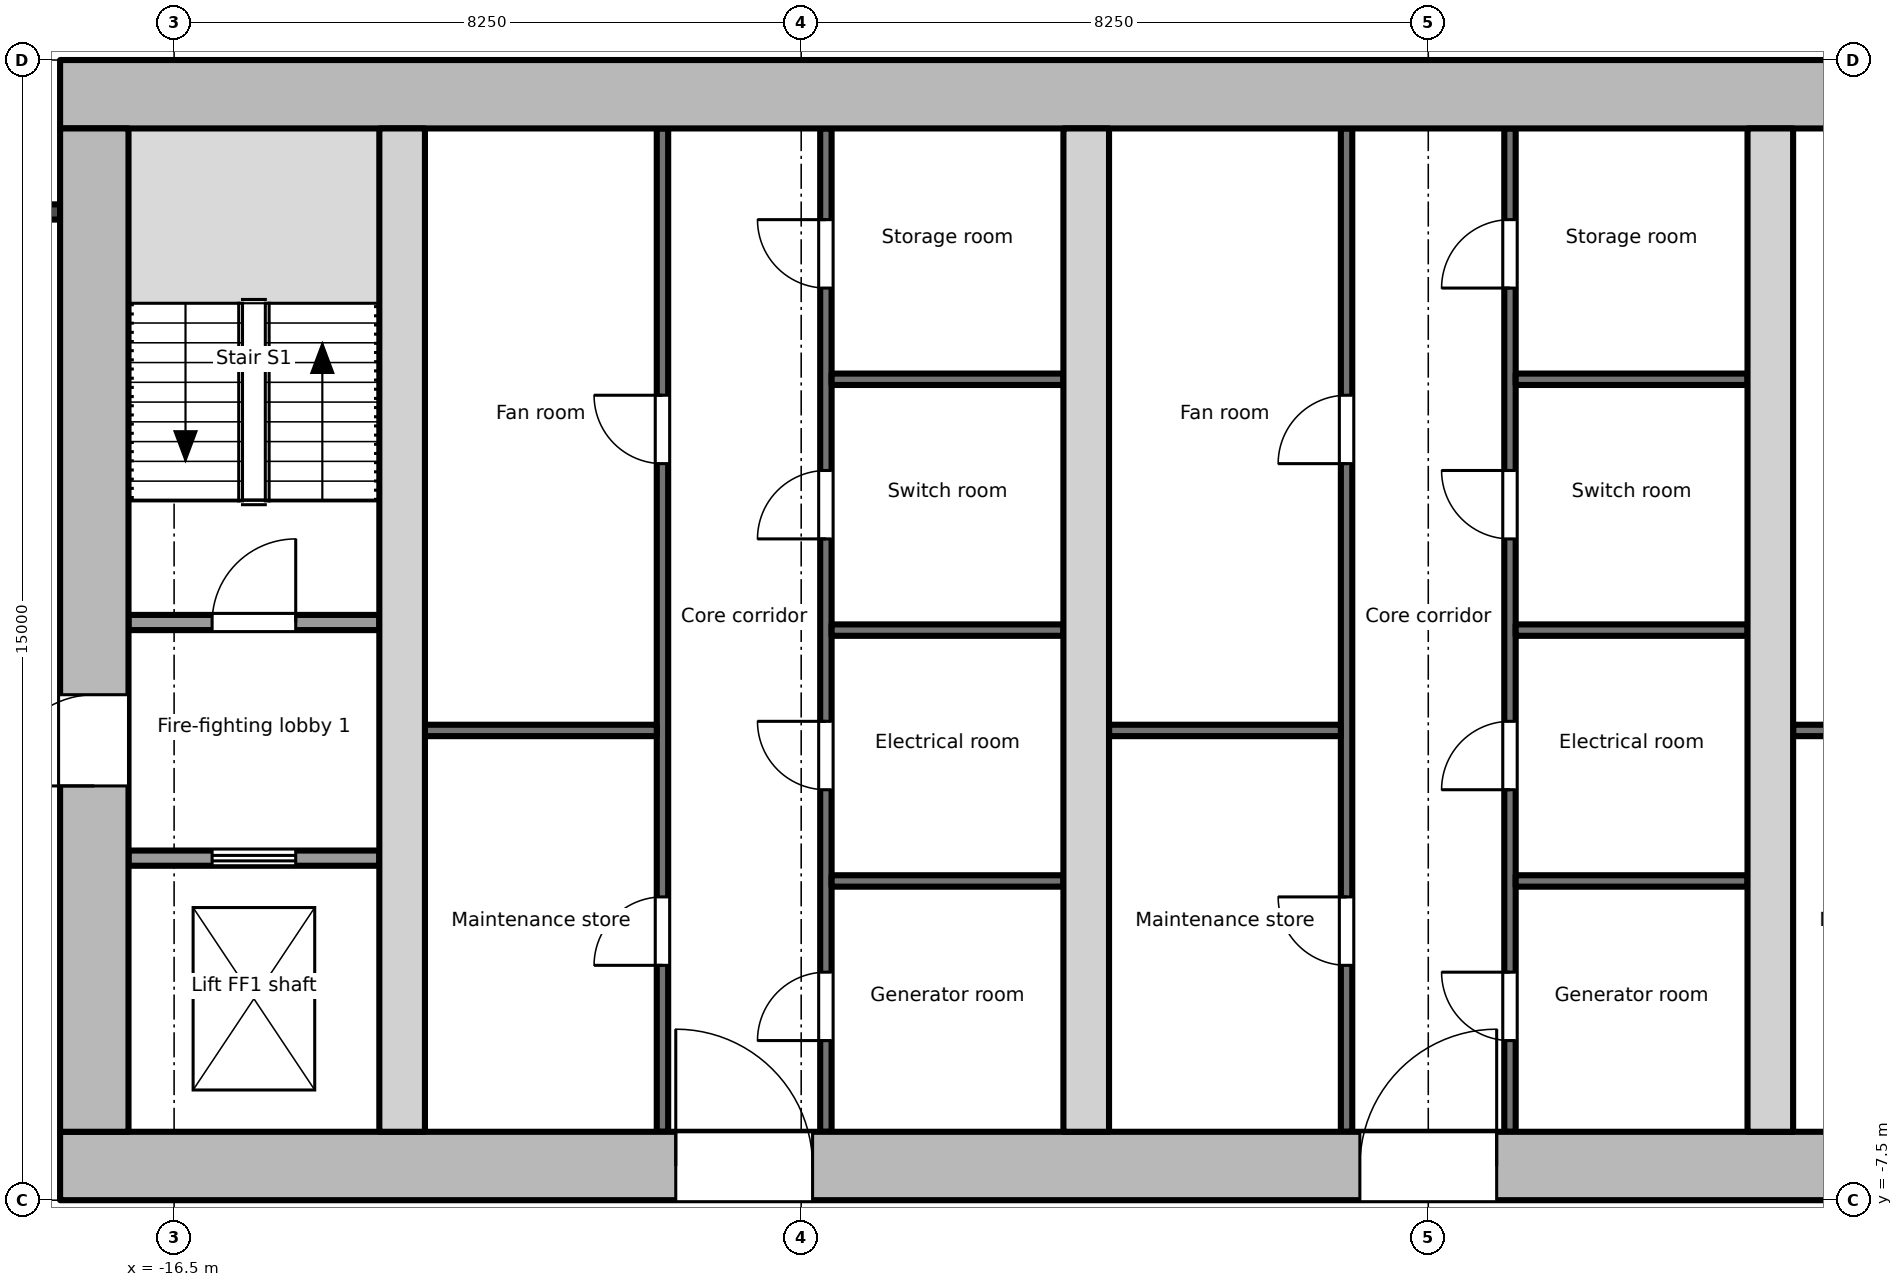
"""IFC4 building model, lengths in metres.
Left out: names, types, materials, properties, quantities, classifications, styles, units other than length and angle.
Written with IfcOpenShell. Run it as: python <this file> out.ifc"""

import sys

from ifc_helpers import new_model, si_unit, direction, frame, frame_2d, origin, place, context, subcontext, project, spatial, rectangle, extrude, element, fill, save


model = new_model("IFC4")
c1 = context("Model", 3, precision=1e-05, world=origin(), true_north=direction((0.0, 1.0)))
c2 = subcontext(c1, "Body", "Model", "MODEL_VIEW")
j1 = project(units=[si_unit("LENGTHUNIT", "METRE"), si_unit("PLANEANGLEUNIT", "RADIAN")], contexts=[c1])
p1 = place(None, origin())
s1 = spatial("IfcSite", under=j1, at=p1, CompositionType="ELEMENT")
p2 = place(p1, origin())
s2 = spatial("IfcBuilding", under=s1, at=p2, CompositionType="ELEMENT")
p3 = place(p2, frame((0.0, 0.0, 300.3)))
s3 = spatial("IfcBuildingStorey", under=s2, at=p3, CompositionType="ELEMENT", Elevation=300.3)
p4 = place(p3, frame((-18.0, -7.05, -0.2), z_axis=(0.0, 0.0, 1.0), x_axis=(1.0, 0.0, 0.0)))
e1 = element("IfcWall", 1, at=p4, inside=s3, PredefinedType="SHEAR", context=c2, shape_type="SweptSolid", body=[
    extrude(rectangle(XDim=36.0, YDim=0.9, at=frame_2d((18.0, 0.0))), origin(), (0.0, 0.0, 1.0), 4.0),
])
p5 = place(p4, frame((8.1, 0.0, 0.2)))
e2 = element("IfcOpeningElement", 2, at=p5, cuts=e1, PredefinedType="OPENING", context=c2, shape_type="SweptSolid", body=[
    extrude(rectangle(XDim=1.8, YDim=2.1, at=frame_2d((0.9, 1.05))), frame((0.0, 0.46, 0.0), z_axis=(0.0, -1.0, 0.0), x_axis=(1.0, 0.0, 0.0)), (0.0, 0.0, 1.0), 0.921),
])
p6 = place(p4, frame((17.1, 0.0, 0.2)))
e3 = element("IfcOpeningElement", 3, at=p6, cuts=e1, PredefinedType="OPENING", context=c2, shape_type="SweptSolid", body=[
    extrude(rectangle(XDim=1.8, YDim=2.1, at=frame_2d((0.9, 1.05))), frame((0.0, 0.46, 0.0), z_axis=(0.0, -1.0, 0.0), x_axis=(1.0, 0.0, 0.0)), (0.0, 0.0, 1.0), 0.921),
])
p7 = place(p4, frame((26.1, 0.0, 0.2)))
e4 = element("IfcOpeningElement", 4, at=p7, cuts=e1, PredefinedType="OPENING", context=c2, shape_type="SweptSolid", body=[
    extrude(rectangle(XDim=1.8, YDim=2.1, at=frame_2d((0.9, 1.05))), frame((0.0, 0.46, 0.0), z_axis=(0.0, -1.0, 0.0), x_axis=(1.0, 0.0, 0.0)), (0.0, 0.0, 1.0), 0.921),
])
p8 = place(p3, frame((-18.0, 7.05, -0.2), z_axis=(0.0, 0.0, 1.0), x_axis=(1.0, 0.0, 0.0)))
e5 = element("IfcWall", 5, at=p8, inside=s3, PredefinedType="SHEAR", context=c2, shape_type="SweptSolid", body=[
    extrude(rectangle(XDim=36.0, YDim=0.9, at=frame_2d((18.0, 0.0))), origin(), (0.0, 0.0, 1.0), 4.0),
])
p9 = place(p3, frame((-17.55, -6.6, -0.2), z_axis=(0.0, 0.0, 1.0), x_axis=(0.0, 1.0, 0.0)))
e6 = element("IfcWall", 6, at=p9, inside=s3, PredefinedType="SHEAR", context=c2, shape_type="SweptSolid", body=[
    extrude(rectangle(XDim=13.2, YDim=0.9, at=frame_2d((6.6, 0.0))), origin(), (0.0, 0.0, 1.0), 4.0),
])
p10 = place(p9, frame((4.55, 0.0, 0.2)))
e7 = element("IfcOpeningElement", 7, at=p10, cuts=e6, PredefinedType="OPENING", context=c2, shape_type="SweptSolid", body=[
    extrude(rectangle(XDim=1.2, YDim=2.1, at=frame_2d((0.6, 1.05))), frame((0.0, 0.46, 0.0), z_axis=(0.0, -1.0, 0.0), x_axis=(1.0, 0.0, 0.0)), (0.0, 0.0, 1.0), 0.921),
])
for number, where, z_axis, x_axis in (
    (8, (-13.5, -6.6, -0.2), (0.0, 0.0, 1.0), (0.0, 1.0, 0.0)),
    (9, (-4.5, -6.6, -0.2), (0.0, 0.0, 1.0), (0.0, 1.0, 0.0)),
    (10, (4.5, -6.6, -0.2), (0.0, 0.0, 1.0), (0.0, 1.0, 0.0)),
):
    element("IfcWall", number, at=place(p3, frame(where, z_axis=z_axis, x_axis=x_axis)), inside=s3, PredefinedType="SHEAR", context=c2, shape_type="SweptSolid", body=[
        extrude(rectangle(XDim=13.2, YDim=0.6, at=frame_2d((6.6, 0.0))), origin(), (0.0, 0.0, 1.0), 4.0),
    ])
p11 = place(p3, frame((-17.1, -3.0, 0.0), z_axis=(0.0, 0.0, 1.0), x_axis=(1.0, 0.0, 0.0)))
e11 = element("IfcWall", 11, at=p11, inside=s3, PredefinedType="PARTITIONING", context=c2, shape_type="SweptSolid", body=[
    extrude(rectangle(XDim=3.3, YDim=0.2, at=frame_2d((1.65, 0.0))), origin(), (0.0, 0.0, 1.0), 3.8),
])
p12 = place(p11, frame((1.1, 0.0, 0.0)))
e12 = element("IfcOpeningElement", 12, at=p12, cuts=e11, PredefinedType="OPENING", context=c2, shape_type="SweptSolid", body=[
    extrude(rectangle(XDim=1.1, YDim=2.1, at=frame_2d((0.55, 1.05))), frame((0.0, 0.111, 0.0), z_axis=(0.0, -1.0, 0.0), x_axis=(1.0, 0.0, 0.0)), (0.0, 0.0, 1.0), 0.221),
])
p13 = place(p3, frame((-17.1, 0.1, 0.0), z_axis=(0.0, 0.0, 1.0), x_axis=(1.0, 0.0, 0.0)))
e13 = element("IfcWall", 13, at=p13, inside=s3, PredefinedType="PARTITIONING", context=c2, shape_type="SweptSolid", body=[
    extrude(rectangle(XDim=3.3, YDim=0.2, at=frame_2d((1.65, 0.0))), origin(), (0.0, 0.0, 1.0), 3.8),
])
p14 = place(p13, frame((1.1, 0.0, 0.0)))
e14 = element("IfcOpeningElement", 14, at=p14, cuts=e13, PredefinedType="OPENING", context=c2, shape_type="SweptSolid", body=[
    extrude(rectangle(XDim=1.1, YDim=2.1, at=frame_2d((0.55, 1.05))), frame((0.0, 0.111, 0.0), z_axis=(0.0, -1.0, 0.0), x_axis=(1.0, 0.0, 0.0)), (0.0, 0.0, 1.0), 0.221),
])
p15 = place(p3, frame((-10.075, -6.6, 0.0), z_axis=(0.0, 0.0, 1.0), x_axis=(0.0, 1.0, 0.0)))
e15 = element("IfcWall", 15, at=p15, inside=s3, PredefinedType="PARTITIONING", context=c2, shape_type="SweptSolid", body=[
    extrude(rectangle(XDim=13.2, YDim=0.15, at=frame_2d((6.6, 0.0))), origin(), (0.0, 0.0, 1.0), 3.8),
])
p16 = place(p15, frame((2.19, 0.0, 0.0)))
e16 = element("IfcOpeningElement", 16, at=p16, cuts=e15, PredefinedType="OPENING", context=c2, shape_type="SweptSolid", body=[
    extrude(rectangle(XDim=0.9, YDim=2.1, at=frame_2d((0.45, 1.05))), frame((0.0, 0.085, 0.0), z_axis=(0.0, -1.0, 0.0), x_axis=(1.0, 0.0, 0.0)), (0.0, 0.0, 1.0), 0.171),
])
p17 = place(p15, frame((8.79, 0.0, 0.0)))
e17 = element("IfcOpeningElement", 17, at=p17, cuts=e15, PredefinedType="OPENING", context=c2, shape_type="SweptSolid", body=[
    extrude(rectangle(XDim=0.9, YDim=2.1, at=frame_2d((0.45, 1.05))), frame((0.0, 0.085, 0.0), z_axis=(0.0, -1.0, 0.0), x_axis=(1.0, 0.0, 0.0)), (0.0, 0.0, 1.0), 0.171),
])
p18 = place(p3, frame((-13.2, -1.32, 0.0), z_axis=(0.0, 0.0, 1.0), x_axis=(1.0, 0.0, 0.0)))
e18 = element("IfcWall", 18, at=p18, inside=s3, PredefinedType="PARTITIONING", context=c2, shape_type="SweptSolid", body=[
    extrude(rectangle(XDim=3.05, YDim=0.15, at=frame_2d((1.525, 0.0))), origin(), (0.0, 0.0, 1.0), 3.8),
])
p19 = place(p3, frame((-7.925, -6.6, 0.0), z_axis=(0.0, 0.0, 1.0), x_axis=(0.0, 1.0, 0.0)))
e19 = element("IfcWall", 19, at=p19, inside=s3, PredefinedType="PARTITIONING", context=c2, shape_type="SweptSolid", body=[
    extrude(rectangle(XDim=13.2, YDim=0.15, at=frame_2d((6.6, 0.0))), origin(), (0.0, 0.0, 1.0), 3.8),
])
p20 = place(p19, frame((1.2, 0.0, 0.0)))
e20 = element("IfcOpeningElement", 20, at=p20, cuts=e19, PredefinedType="OPENING", context=c2, shape_type="SweptSolid", body=[
    extrude(rectangle(XDim=0.9, YDim=2.1, at=frame_2d((0.45, 1.05))), frame((0.0, 0.085, 0.0), z_axis=(0.0, -1.0, 0.0), x_axis=(1.0, 0.0, 0.0)), (0.0, 0.0, 1.0), 0.171),
])
p21 = place(p19, frame((4.5, 0.0, 0.0)))
e21 = element("IfcOpeningElement", 21, at=p21, cuts=e19, PredefinedType="OPENING", context=c2, shape_type="SweptSolid", body=[
    extrude(rectangle(XDim=0.9, YDim=2.1, at=frame_2d((0.45, 1.05))), frame((0.0, 0.085, 0.0), z_axis=(0.0, -1.0, 0.0), x_axis=(1.0, 0.0, 0.0)), (0.0, 0.0, 1.0), 0.171),
])
p22 = place(p19, frame((7.8, 0.0, 0.0)))
e22 = element("IfcOpeningElement", 22, at=p22, cuts=e19, PredefinedType="OPENING", context=c2, shape_type="SweptSolid", body=[
    extrude(rectangle(XDim=0.9, YDim=2.1, at=frame_2d((0.45, 1.05))), frame((0.0, 0.085, 0.0), z_axis=(0.0, -1.0, 0.0), x_axis=(1.0, 0.0, 0.0)), (0.0, 0.0, 1.0), 0.171),
])
p23 = place(p19, frame((11.1, 0.0, 0.0)))
e23 = element("IfcOpeningElement", 23, at=p23, cuts=e19, PredefinedType="OPENING", context=c2, shape_type="SweptSolid", body=[
    extrude(rectangle(XDim=0.9, YDim=2.1, at=frame_2d((0.45, 1.05))), frame((0.0, 0.085, 0.0), z_axis=(0.0, -1.0, 0.0), x_axis=(1.0, 0.0, 0.0)), (0.0, 0.0, 1.0), 0.171),
])
for number, where, z_axis, x_axis in (
    (24, (-7.85, -3.3, 0.0), (0.0, 0.0, 1.0), (1.0, 0.0, 0.0)),
    (25, (-7.85, 0.0, 0.0), (0.0, 0.0, 1.0), (1.0, 0.0, 0.0)),
    (26, (-7.85, 3.3, 0.0), (0.0, 0.0, 1.0), (1.0, 0.0, 0.0)),
):
    element("IfcWall", number, at=place(p3, frame(where, z_axis=z_axis, x_axis=x_axis)), inside=s3, PredefinedType="PARTITIONING", context=c2, shape_type="SweptSolid", body=[
        extrude(rectangle(XDim=3.05, YDim=0.15, at=frame_2d((1.525, 0.0))), origin(), (0.0, 0.0, 1.0), 3.8),
    ])
p24 = place(p3, frame((-1.075, -6.6, 0.0), z_axis=(0.0, 0.0, 1.0), x_axis=(0.0, 1.0, 0.0)))
e27 = element("IfcWall", 27, at=p24, inside=s3, PredefinedType="PARTITIONING", context=c2, shape_type="SweptSolid", body=[
    extrude(rectangle(XDim=13.2, YDim=0.15, at=frame_2d((6.6, 0.0))), origin(), (0.0, 0.0, 1.0), 3.8),
])
p25 = place(p24, frame((2.19, 0.0, 0.0)))
e28 = element("IfcOpeningElement", 28, at=p25, cuts=e27, PredefinedType="OPENING", context=c2, shape_type="SweptSolid", body=[
    extrude(rectangle(XDim=0.9, YDim=2.1, at=frame_2d((0.45, 1.05))), frame((0.0, 0.085, 0.0), z_axis=(0.0, -1.0, 0.0), x_axis=(1.0, 0.0, 0.0)), (0.0, 0.0, 1.0), 0.171),
])
p26 = place(p24, frame((8.79, 0.0, 0.0)))
e29 = element("IfcOpeningElement", 29, at=p26, cuts=e27, PredefinedType="OPENING", context=c2, shape_type="SweptSolid", body=[
    extrude(rectangle(XDim=0.9, YDim=2.1, at=frame_2d((0.45, 1.05))), frame((0.0, 0.085, 0.0), z_axis=(0.0, -1.0, 0.0), x_axis=(1.0, 0.0, 0.0)), (0.0, 0.0, 1.0), 0.171),
])
p27 = place(p3, frame((-4.2, -1.32, 0.0), z_axis=(0.0, 0.0, 1.0), x_axis=(1.0, 0.0, 0.0)))
e30 = element("IfcWall", 30, at=p27, inside=s3, PredefinedType="PARTITIONING", context=c2, shape_type="SweptSolid", body=[
    extrude(rectangle(XDim=3.05, YDim=0.15, at=frame_2d((1.525, 0.0))), origin(), (0.0, 0.0, 1.0), 3.8),
])
p28 = place(p3, frame((1.075, -6.6, 0.0), z_axis=(0.0, 0.0, 1.0), x_axis=(0.0, 1.0, 0.0)))
e31 = element("IfcWall", 31, at=p28, inside=s3, PredefinedType="PARTITIONING", context=c2, shape_type="SweptSolid", body=[
    extrude(rectangle(XDim=13.2, YDim=0.15, at=frame_2d((6.6, 0.0))), origin(), (0.0, 0.0, 1.0), 3.8),
])
p29 = place(p28, frame((1.2, 0.0, 0.0)))
e32 = element("IfcOpeningElement", 32, at=p29, cuts=e31, PredefinedType="OPENING", context=c2, shape_type="SweptSolid", body=[
    extrude(rectangle(XDim=0.9, YDim=2.1, at=frame_2d((0.45, 1.05))), frame((0.0, 0.085, 0.0), z_axis=(0.0, -1.0, 0.0), x_axis=(1.0, 0.0, 0.0)), (0.0, 0.0, 1.0), 0.171),
])
p30 = place(p28, frame((4.5, 0.0, 0.0)))
e33 = element("IfcOpeningElement", 33, at=p30, cuts=e31, PredefinedType="OPENING", context=c2, shape_type="SweptSolid", body=[
    extrude(rectangle(XDim=0.9, YDim=2.1, at=frame_2d((0.45, 1.05))), frame((0.0, 0.085, 0.0), z_axis=(0.0, -1.0, 0.0), x_axis=(1.0, 0.0, 0.0)), (0.0, 0.0, 1.0), 0.171),
])
p31 = place(p28, frame((7.8, 0.0, 0.0)))
e34 = element("IfcOpeningElement", 34, at=p31, cuts=e31, PredefinedType="OPENING", context=c2, shape_type="SweptSolid", body=[
    extrude(rectangle(XDim=0.9, YDim=2.1, at=frame_2d((0.45, 1.05))), frame((0.0, 0.085, 0.0), z_axis=(0.0, -1.0, 0.0), x_axis=(1.0, 0.0, 0.0)), (0.0, 0.0, 1.0), 0.171),
])
p32 = place(p28, frame((11.1, 0.0, 0.0)))
e35 = element("IfcOpeningElement", 35, at=p32, cuts=e31, PredefinedType="OPENING", context=c2, shape_type="SweptSolid", body=[
    extrude(rectangle(XDim=0.9, YDim=2.1, at=frame_2d((0.45, 1.05))), frame((0.0, 0.085, 0.0), z_axis=(0.0, -1.0, 0.0), x_axis=(1.0, 0.0, 0.0)), (0.0, 0.0, 1.0), 0.171),
])
for number, where, z_axis, x_axis in (
    (36, (1.15, -3.3, 0.0), (0.0, 0.0, 1.0), (1.0, 0.0, 0.0)),
    (37, (1.15, 0.0, 0.0), (0.0, 0.0, 1.0), (1.0, 0.0, 0.0)),
    (38, (1.15, 3.3, 0.0), (0.0, 0.0, 1.0), (1.0, 0.0, 0.0)),
    (39, (4.8, -1.32, 0.0), (0.0, 0.0, 1.0), (1.0, 0.0, 0.0)),
):
    element("IfcWall", number, at=place(p3, frame(where, z_axis=z_axis, x_axis=x_axis)), inside=s3, PredefinedType="PARTITIONING", context=c2, shape_type="SweptSolid", body=[
        extrude(rectangle(XDim=3.05, YDim=0.15, at=frame_2d((1.525, 0.0))), origin(), (0.0, 0.0, 1.0), 3.8),
    ])
p33 = place(p3, frame((-20.3, 5.501, 0.0), z_axis=(0.0, 0.0, 1.0), x_axis=(1.0, 0.0, 0.0)))
e40 = element("IfcWall", 40, at=p33, inside=s3, PredefinedType="PARTITIONING", context=c2, shape_type="SweptSolid", body=[
    extrude(rectangle(XDim=2.3, YDim=0.2, at=frame_2d((1.15, 0.0))), origin(), (0.0, 0.0, 1.0), 3.8),
])
p34 = place(p12, origin())
e41 = element("IfcDoor", 41, at=p34, inside=s3, OperationType="DOUBLE_DOOR_SLIDING", PredefinedType="DOOR", context=c2, shape_type="SweptSolid", body=[
    extrude(rectangle(XDim=1.1, YDim=2.1, at=frame_2d((0.55, 1.05))), frame((0.0, 0.025, 0.0), z_axis=(0.0, -1.0, 0.0), x_axis=(1.0, 0.0, 0.0)), (0.0, 0.0, 1.0), 0.05),
])
fill(e12, e41)
p35 = place(p10, origin())
e42 = element("IfcDoor", 42, at=p35, inside=s3, OperationType="SINGLE_SWING_LEFT", PredefinedType="DOOR", context=c2, shape_type="SweptSolid", body=[
    extrude(rectangle(XDim=1.2, YDim=2.1, at=frame_2d((0.6, 1.05))), frame((0.0, 0.025, 0.0), z_axis=(0.0, -1.0, 0.0), x_axis=(1.0, 0.0, 0.0)), (0.0, 0.0, 1.0), 0.05),
])
fill(e7, e42)
p36 = place(p14, origin())
e43 = element("IfcDoor", 43, at=p36, inside=s3, OperationType="SINGLE_SWING_RIGHT", PredefinedType="DOOR", context=c2, shape_type="SweptSolid", body=[
    extrude(rectangle(XDim=1.1, YDim=2.1, at=frame_2d((0.55, 1.05))), frame((0.0, 0.025, 0.0), z_axis=(0.0, -1.0, 0.0), x_axis=(1.0, 0.0, 0.0)), (0.0, 0.0, 1.0), 0.05),
])
fill(e14, e43)
p37 = place(p16, origin())
e44 = element("IfcDoor", 44, at=p37, inside=s3, OperationType="SINGLE_SWING_LEFT", PredefinedType="DOOR", context=c2, shape_type="SweptSolid", body=[
    extrude(rectangle(XDim=0.9, YDim=2.1, at=frame_2d((0.45, 1.05))), frame((0.0, 0.025, 0.0), z_axis=(0.0, -1.0, 0.0), x_axis=(1.0, 0.0, 0.0)), (0.0, 0.0, 1.0), 0.05),
])
fill(e16, e44)
p38 = place(p17, origin())
e45 = element("IfcDoor", 45, at=p38, inside=s3, OperationType="SINGLE_SWING_RIGHT", PredefinedType="DOOR", context=c2, shape_type="SweptSolid", body=[
    extrude(rectangle(XDim=0.9, YDim=2.1, at=frame_2d((0.45, 1.05))), frame((0.0, 0.025, 0.0), z_axis=(0.0, -1.0, 0.0), x_axis=(1.0, 0.0, 0.0)), (0.0, 0.0, 1.0), 0.05),
])
fill(e17, e45)
p39 = place(p20, origin())
e46 = element("IfcDoor", 46, at=p39, inside=s3, OperationType="SINGLE_SWING_LEFT", PredefinedType="DOOR", context=c2, shape_type="SweptSolid", body=[
    extrude(rectangle(XDim=0.9, YDim=2.1, at=frame_2d((0.45, 1.05))), frame((0.0, 0.025, 0.0), z_axis=(0.0, -1.0, 0.0), x_axis=(1.0, 0.0, 0.0)), (0.0, 0.0, 1.0), 0.05),
])
fill(e20, e46)
p40 = place(p21, origin())
e47 = element("IfcDoor", 47, at=p40, inside=s3, OperationType="SINGLE_SWING_RIGHT", PredefinedType="DOOR", context=c2, shape_type="SweptSolid", body=[
    extrude(rectangle(XDim=0.9, YDim=2.1, at=frame_2d((0.45, 1.05))), frame((0.0, 0.025, 0.0), z_axis=(0.0, -1.0, 0.0), x_axis=(1.0, 0.0, 0.0)), (0.0, 0.0, 1.0), 0.05),
])
fill(e21, e47)
p41 = place(p22, origin())
e48 = element("IfcDoor", 48, at=p41, inside=s3, OperationType="SINGLE_SWING_LEFT", PredefinedType="DOOR", context=c2, shape_type="SweptSolid", body=[
    extrude(rectangle(XDim=0.9, YDim=2.1, at=frame_2d((0.45, 1.05))), frame((0.0, 0.025, 0.0), z_axis=(0.0, -1.0, 0.0), x_axis=(1.0, 0.0, 0.0)), (0.0, 0.0, 1.0), 0.05),
])
fill(e22, e48)
p42 = place(p23, origin())
e49 = element("IfcDoor", 49, at=p42, inside=s3, OperationType="SINGLE_SWING_RIGHT", PredefinedType="DOOR", context=c2, shape_type="SweptSolid", body=[
    extrude(rectangle(XDim=0.9, YDim=2.1, at=frame_2d((0.45, 1.05))), frame((0.0, 0.025, 0.0), z_axis=(0.0, -1.0, 0.0), x_axis=(1.0, 0.0, 0.0)), (0.0, 0.0, 1.0), 0.05),
])
fill(e23, e49)
p43 = place(p5, origin())
e50 = element("IfcDoor", 50, at=p43, inside=s3, OperationType="SINGLE_SWING_LEFT", PredefinedType="DOOR", context=c2, shape_type="SweptSolid", body=[
    extrude(rectangle(XDim=1.8, YDim=2.1, at=frame_2d((0.9, 1.05))), frame((0.0, 0.025, 0.0), z_axis=(0.0, -1.0, 0.0), x_axis=(1.0, 0.0, 0.0)), (0.0, 0.0, 1.0), 0.05),
])
fill(e2, e50)
p44 = place(p25, origin())
e51 = element("IfcDoor", 51, at=p44, inside=s3, OperationType="SINGLE_SWING_RIGHT", PredefinedType="DOOR", context=c2, shape_type="SweptSolid", body=[
    extrude(rectangle(XDim=0.9, YDim=2.1, at=frame_2d((0.45, 1.05))), frame((0.0, 0.025, 0.0), z_axis=(0.0, -1.0, 0.0), x_axis=(1.0, 0.0, 0.0)), (0.0, 0.0, 1.0), 0.05),
])
fill(e28, e51)
p45 = place(p26, origin())
e52 = element("IfcDoor", 52, at=p45, inside=s3, OperationType="SINGLE_SWING_LEFT", PredefinedType="DOOR", context=c2, shape_type="SweptSolid", body=[
    extrude(rectangle(XDim=0.9, YDim=2.1, at=frame_2d((0.45, 1.05))), frame((0.0, 0.025, 0.0), z_axis=(0.0, -1.0, 0.0), x_axis=(1.0, 0.0, 0.0)), (0.0, 0.0, 1.0), 0.05),
])
fill(e29, e52)
p46 = place(p29, origin())
e53 = element("IfcDoor", 53, at=p46, inside=s3, OperationType="SINGLE_SWING_RIGHT", PredefinedType="DOOR", context=c2, shape_type="SweptSolid", body=[
    extrude(rectangle(XDim=0.9, YDim=2.1, at=frame_2d((0.45, 1.05))), frame((0.0, 0.025, 0.0), z_axis=(0.0, -1.0, 0.0), x_axis=(1.0, 0.0, 0.0)), (0.0, 0.0, 1.0), 0.05),
])
fill(e32, e53)
p47 = place(p30, origin())
e54 = element("IfcDoor", 54, at=p47, inside=s3, OperationType="SINGLE_SWING_LEFT", PredefinedType="DOOR", context=c2, shape_type="SweptSolid", body=[
    extrude(rectangle(XDim=0.9, YDim=2.1, at=frame_2d((0.45, 1.05))), frame((0.0, 0.025, 0.0), z_axis=(0.0, -1.0, 0.0), x_axis=(1.0, 0.0, 0.0)), (0.0, 0.0, 1.0), 0.05),
])
fill(e33, e54)
p48 = place(p31, origin())
e55 = element("IfcDoor", 55, at=p48, inside=s3, OperationType="SINGLE_SWING_RIGHT", PredefinedType="DOOR", context=c2, shape_type="SweptSolid", body=[
    extrude(rectangle(XDim=0.9, YDim=2.1, at=frame_2d((0.45, 1.05))), frame((0.0, 0.025, 0.0), z_axis=(0.0, -1.0, 0.0), x_axis=(1.0, 0.0, 0.0)), (0.0, 0.0, 1.0), 0.05),
])
fill(e34, e55)
p49 = place(p32, origin())
e56 = element("IfcDoor", 56, at=p49, inside=s3, OperationType="SINGLE_SWING_LEFT", PredefinedType="DOOR", context=c2, shape_type="SweptSolid", body=[
    extrude(rectangle(XDim=0.9, YDim=2.1, at=frame_2d((0.45, 1.05))), frame((0.0, 0.025, 0.0), z_axis=(0.0, -1.0, 0.0), x_axis=(1.0, 0.0, 0.0)), (0.0, 0.0, 1.0), 0.05),
])
fill(e35, e56)
p50 = place(p6, origin())
e57 = element("IfcDoor", 57, at=p50, inside=s3, OperationType="SINGLE_SWING_RIGHT", PredefinedType="DOOR", context=c2, shape_type="SweptSolid", body=[
    extrude(rectangle(XDim=1.8, YDim=2.1, at=frame_2d((0.9, 1.05))), frame((0.0, 0.025, 0.0), z_axis=(0.0, -1.0, 0.0), x_axis=(1.0, 0.0, 0.0)), (0.0, 0.0, 1.0), 0.05),
])
fill(e3, e57)
save(model, sys.argv[1])
